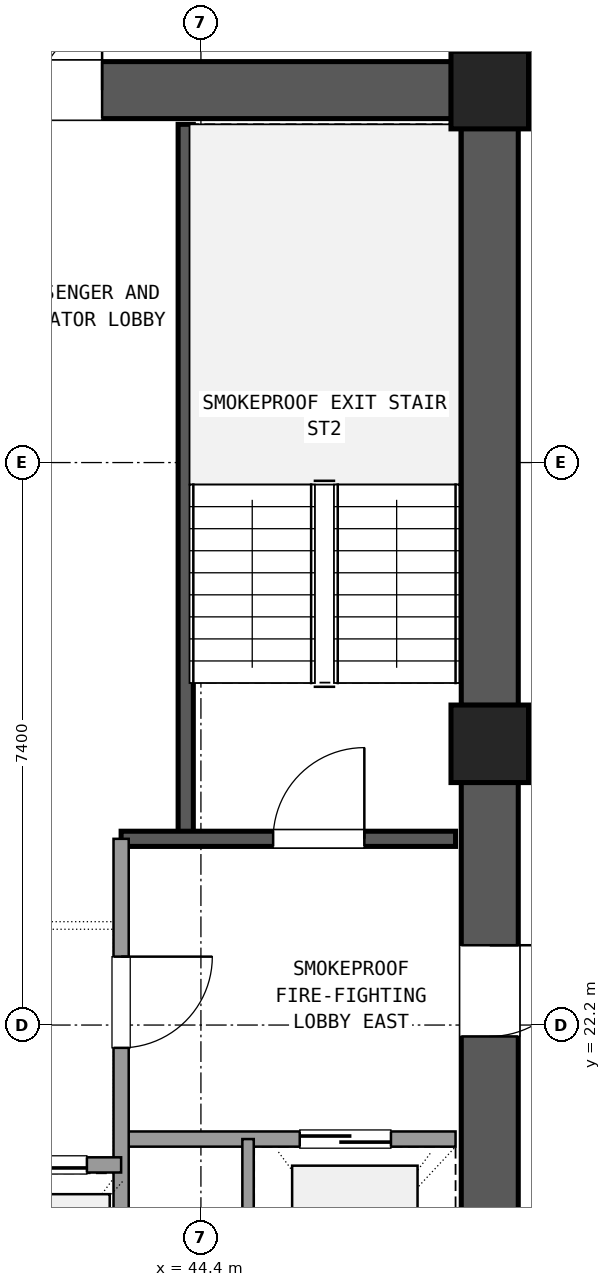
"""IFC4 building model, lengths in metres.
Left out: names, types, materials, properties, quantities, classifications, styles, units other than length and angle.
Written with IfcOpenShell. Run it as: python <this file> out.ifc"""

import sys

from ifc_helpers import new_model, si_unit, direction, frame, frame_2d, origin, origin_2d, place, context, subcontext, project, spatial, rectangle, extrude, element, fill, save


model = new_model("IFC4")
c1 = context("Model", 3, precision=1e-05, world=origin(), true_north=direction((0.0, 1.0)))
c2 = subcontext(c1, "Body", "Model", "MODEL_VIEW")
j1 = project(units=[si_unit("LENGTHUNIT", "METRE"), si_unit("PLANEANGLEUNIT", "RADIAN")], contexts=[c1])
p1 = place(None, origin())
s1 = spatial("IfcSite", under=j1, at=p1, CompositionType="ELEMENT")
p2 = place(p1, origin())
s2 = spatial("IfcBuilding", under=s1, at=p2, CompositionType="ELEMENT")
p3 = place(p2, frame((0.0, 0.0, 117.18)))
s3 = spatial("IfcBuildingStorey", under=s2, at=p3, CompositionType="ELEMENT", Elevation=117.18)
for number, where, z_axis, x_axis in (
    (1, (48.2, 25.9, 0.0), (0.0, 0.0, 1.0), (1.0, 0.0, 0.0)),
    (2, (48.2, 34.5, 0.0), (0.0, 0.0, 1.0), (1.0, 0.0, 0.0)),
):
    element("IfcColumn", number, at=place(p3, frame(where, z_axis=z_axis, x_axis=x_axis)), inside=s3, PredefinedType="COLUMN", context=c2, shape_type="SweptSolid", body=[
        extrude(rectangle(XDim=1.02, YDim=1.02, at=origin_2d()), origin(), (0.0, 0.0, 1.0), 3.6),
    ])
p4 = place(p3, frame((48.2, 17.805, 0.0), z_axis=(0.0, 0.0, 1.0), x_axis=(0.0, 1.0, 0.0)))
e3 = element("IfcWall", 3, at=p4, inside=s3, PredefinedType="SHEAR", context=c2, shape_type="SweptSolid", body=[
    extrude(rectangle(XDim=7.59, YDim=0.75, at=frame_2d((3.795, 0.0))), origin(), (0.0, 0.0, 1.0), 3.32),
])
p5 = place(p4, frame((4.245, 0.0, 0.0)))
e4 = element("IfcOpeningElement", 4, at=p5, cuts=e3, PredefinedType="OPENING", context=c2, shape_type="SweptSolid", body=[
    extrude(rectangle(XDim=1.2, YDim=2.15, at=frame_2d((0.6, 1.075))), frame((0.0, 0.385, 0.0), z_axis=(0.0, -1.0, 0.0), x_axis=(1.0, 0.0, 0.0)), (0.0, 0.0, 1.0), 0.77),
])
p6 = place(p3, frame((48.2, 26.405, 0.0), z_axis=(0.0, 0.0, 1.0), x_axis=(0.0, 1.0, 0.0)))
e5 = element("IfcWall", 5, at=p6, inside=s3, PredefinedType="SHEAR", context=c2, shape_type="SweptSolid", body=[
    extrude(rectangle(XDim=7.59, YDim=0.75, at=frame_2d((3.795, 0.0))), origin(), (0.0, 0.0, 1.0), 3.32),
])
p7 = place(p3, frame((47.695, 34.5, 0.0), z_axis=(0.0, 0.0, 1.0), x_axis=(-1.0, 0.0, 0.0)))
e6 = element("IfcWall", 6, at=p7, inside=s3, PredefinedType="SHEAR", context=c2, shape_type="SweptSolid", body=[
    extrude(rectangle(XDim=10.19, YDim=0.75, at=frame_2d((5.095, 0.0))), origin(), (0.0, 0.0, 1.0), 3.32),
])
p8 = place(p7, frame((4.595, 0.0, 0.0)))
e7 = element("IfcOpeningElement", 7, at=p8, cuts=e6, PredefinedType="OPENING", context=c2, shape_type="SweptSolid", body=[
    extrude(rectangle(XDim=1.6, YDim=2.2, at=frame_2d((0.8, 1.1))), frame((0.0, 0.385, 0.0), z_axis=(0.0, -1.0, 0.0), x_axis=(1.0, 0.0, 0.0)), (0.0, 0.0, 1.0), 0.77),
])
p9 = place(p3, frame((44.2, 24.65, 0.0), z_axis=(0.0, 0.0, 1.0), x_axis=(0.0, 1.0, 0.0)))
e8 = element("IfcWall", 8, at=p9, inside=s3, PredefinedType="SHEAR", context=c2, shape_type="SweptSolid", body=[
    extrude(rectangle(XDim=9.4, YDim=0.2, at=frame_2d((4.7, 0.0))), origin(), (0.0, 0.0, 1.0), 3.32),
])
p10 = place(p3, frame((43.35, 24.65, 0.0), z_axis=(0.0, 0.0, 1.0), x_axis=(1.0, 0.0, 0.0)))
e9 = element("IfcWall", 9, at=p10, inside=s3, PredefinedType="SHEAR", context=c2, shape_type="SweptSolid", body=[
    extrude(rectangle(XDim=4.4, YDim=0.2, at=frame_2d((2.2, 0.0))), origin(), (0.0, 0.0, 1.0), 3.32),
])
p11 = place(p10, frame((2.0, 0.0, 0.0)))
e10 = element("IfcOpeningElement", 10, at=p11, cuts=e9, PredefinedType="OPENING", context=c2, shape_type="SweptSolid", body=[
    extrude(rectangle(XDim=1.2, YDim=2.15, at=frame_2d((0.6, 1.075))), frame((0.0, 0.11, 0.0), z_axis=(0.0, -1.0, 0.0), x_axis=(1.0, 0.0, 0.0)), (0.0, 0.0, 1.0), 0.22),
])
p12 = place(p3, frame((43.35, 20.7, 0.0), z_axis=(0.0, 0.0, 1.0), x_axis=(1.0, 0.0, 0.0)))
e11 = element("IfcWall", 11, at=p12, inside=s3, PredefinedType="SOLIDWALL", context=c2, shape_type="SweptSolid", body=[
    extrude(rectangle(XDim=4.4, YDim=0.2, at=frame_2d((2.2, 0.0))), origin(), (0.0, 0.0, 1.0), 2.61),
])
p13 = place(p12, frame((2.35, 0.0, 0.0)))
e12 = element("IfcOpeningElement", 12, at=p13, cuts=e11, PredefinedType="OPENING", context=c2, shape_type="SweptSolid", body=[
    extrude(rectangle(XDim=1.2, YDim=2.15, at=frame_2d((0.6, 1.075))), frame((0.0, 0.11, 0.0), z_axis=(0.0, -1.0, 0.0), x_axis=(1.0, 0.0, 0.0)), (0.0, 0.0, 1.0), 0.22),
])
p14 = place(p3, frame((43.35, 17.75, 0.0), z_axis=(0.0, 0.0, 1.0), x_axis=(0.0, 1.0, 0.0)))
e13 = element("IfcWall", 13, at=p14, inside=s3, PredefinedType="SOLIDWALL", context=c2, shape_type="SweptSolid", body=[
    extrude(rectangle(XDim=6.9, YDim=0.2, at=frame_2d((3.45, 0.0))), origin(), (0.0, 0.0, 1.0), 2.61),
])
p15 = place(p14, frame((4.15, 0.0, 0.0)))
e14 = element("IfcOpeningElement", 14, at=p15, cuts=e13, PredefinedType="OPENING", context=c2, shape_type="SweptSolid", body=[
    extrude(rectangle(XDim=1.2, YDim=2.15, at=frame_2d((0.6, 1.075))), frame((0.0, 0.11, 0.0), z_axis=(0.0, -1.0, 0.0), x_axis=(1.0, 0.0, 0.0)), (0.0, 0.0, 1.0), 0.22),
])
p16 = place(p3, frame((45.02, 17.75, 0.0), z_axis=(0.0, 0.0, 1.0), x_axis=(0.0, 1.0, 0.0)))
e15 = element("IfcWall", 15, at=p16, inside=s3, PredefinedType="PARTITIONING", context=c2, shape_type="SweptSolid", body=[
    extrude(rectangle(XDim=2.95, YDim=0.15, at=frame_2d((1.475, 0.0))), origin(), (0.0, 0.0, 1.0), 2.61),
])
p17 = place(p3, frame((37.25, 20.36, 0.0), z_axis=(0.0, 0.0, 1.0), x_axis=(1.0, 0.0, 0.0)))
e16 = element("IfcWall", 16, at=p17, inside=s3, PredefinedType="SOLIDWALL", context=c2, shape_type="SweptSolid", body=[
    extrude(rectangle(XDim=6.1, YDim=0.2, at=frame_2d((3.05, 0.0))), origin(), (0.0, 0.0, 1.0), 2.61),
])
p18 = place(p17, frame((0.45, 0.0, 0.0)))
e17 = element("IfcOpeningElement", 17, at=p18, cuts=e16, PredefinedType="OPENING", context=c2, shape_type="SweptSolid", body=[
    extrude(rectangle(XDim=1.1, YDim=2.15, at=frame_2d((0.55, 1.075))), frame((0.0, 0.11, 0.0), z_axis=(0.0, -1.0, 0.0), x_axis=(1.0, 0.0, 0.0)), (0.0, 0.0, 1.0), 0.22),
])
p19 = place(p17, frame((2.5, 0.0, 0.0)))
e18 = element("IfcOpeningElement", 18, at=p19, cuts=e16, PredefinedType="OPENING", context=c2, shape_type="SweptSolid", body=[
    extrude(rectangle(XDim=1.1, YDim=2.15, at=frame_2d((0.55, 1.075))), frame((0.0, 0.11, 0.0), z_axis=(0.0, -1.0, 0.0), x_axis=(1.0, 0.0, 0.0)), (0.0, 0.0, 1.0), 0.22),
])
p20 = place(p17, frame((4.55, 0.0, 0.0)))
e19 = element("IfcOpeningElement", 19, at=p20, cuts=e16, PredefinedType="OPENING", context=c2, shape_type="SweptSolid", body=[
    extrude(rectangle(XDim=1.1, YDim=2.15, at=frame_2d((0.55, 1.075))), frame((0.0, 0.11, 0.0), z_axis=(0.0, -1.0, 0.0), x_axis=(1.0, 0.0, 0.0)), (0.0, 0.0, 1.0), 0.22),
])
p21 = place(p11, origin())
e20 = element("IfcDoor", 20, at=p21, inside=s3, OperationType="SINGLE_SWING_RIGHT", PredefinedType="DOOR", context=c2, shape_type="SweptSolid", body=[
    extrude(rectangle(XDim=1.2, YDim=2.15, at=frame_2d((0.6, 1.075))), frame((0.0, 0.025, 0.0), z_axis=(0.0, -1.0, 0.0), x_axis=(1.0, 0.0, 0.0)), (0.0, 0.0, 1.0), 0.05),
])
fill(e10, e20)
p22 = place(p13, origin())
e21 = element("IfcDoor", 21, at=p22, inside=s3, OperationType="SLIDING_TO_RIGHT", PredefinedType="DOOR", context=c2, shape_type="SweptSolid", body=[
    extrude(rectangle(XDim=1.2, YDim=2.15, at=frame_2d((0.6, 1.075))), frame((0.0, 0.025, 0.0), z_axis=(0.0, -1.0, 0.0), x_axis=(1.0, 0.0, 0.0)), (0.0, 0.0, 1.0), 0.05),
])
fill(e12, e21)
p23 = place(p15, frame((1.2, 0.0, 0.0), z_axis=(0.0, 0.0, 1.0), x_axis=(-1.0, 0.0, 0.0)))
e22 = element("IfcDoor", 22, at=p23, inside=s3, OperationType="SINGLE_SWING_RIGHT", PredefinedType="DOOR", context=c2, shape_type="SweptSolid", body=[
    extrude(rectangle(XDim=1.2, YDim=2.15, at=frame_2d((0.6, 1.075))), frame((0.0, 0.025, 0.0), z_axis=(0.0, -1.0, 0.0), x_axis=(1.0, 0.0, 0.0)), (0.0, 0.0, 1.0), 0.05),
])
fill(e14, e22)
p24 = place(p5, frame((1.2, 0.0, 0.0), z_axis=(0.0, 0.0, 1.0), x_axis=(-1.0, 0.0, 0.0)))
e23 = element("IfcDoor", 23, at=p24, inside=s3, OperationType="SINGLE_SWING_RIGHT", PredefinedType="DOOR", context=c2, shape_type="SweptSolid", body=[
    extrude(rectangle(XDim=1.2, YDim=2.15, at=frame_2d((0.6, 1.075))), frame((0.0, 0.025, 0.0), z_axis=(0.0, -1.0, 0.0), x_axis=(1.0, 0.0, 0.0)), (0.0, 0.0, 1.0), 0.05),
])
fill(e4, e23)
p25 = place(p8, frame((1.6, 0.0, 0.0), z_axis=(0.0, 0.0, 1.0), x_axis=(-1.0, 0.0, 0.0)))
e24 = element("IfcDoor", 24, at=p25, inside=s3, OperationType="DOUBLE_DOOR_SINGLE_SWING", PredefinedType="DOOR", context=c2, shape_type="SweptSolid", body=[
    extrude(rectangle(XDim=1.6, YDim=2.2, at=frame_2d((0.8, 1.1))), frame((0.0, 0.025, 0.0), z_axis=(0.0, -1.0, 0.0), x_axis=(1.0, 0.0, 0.0)), (0.0, 0.0, 1.0), 0.05),
])
fill(e7, e24)
p26 = place(p20, origin())
e25 = element("IfcDoor", 25, at=p26, inside=s3, OperationType="SLIDING_TO_LEFT", PredefinedType="DOOR", context=c2, shape_type="SweptSolid", body=[
    extrude(rectangle(XDim=1.1, YDim=2.15, at=frame_2d((0.55, 1.075))), frame((0.0, 0.025, 0.0), z_axis=(0.0, -1.0, 0.0), x_axis=(1.0, 0.0, 0.0)), (0.0, 0.0, 1.0), 0.05),
])
fill(e19, e25)
save(model, sys.argv[1])
